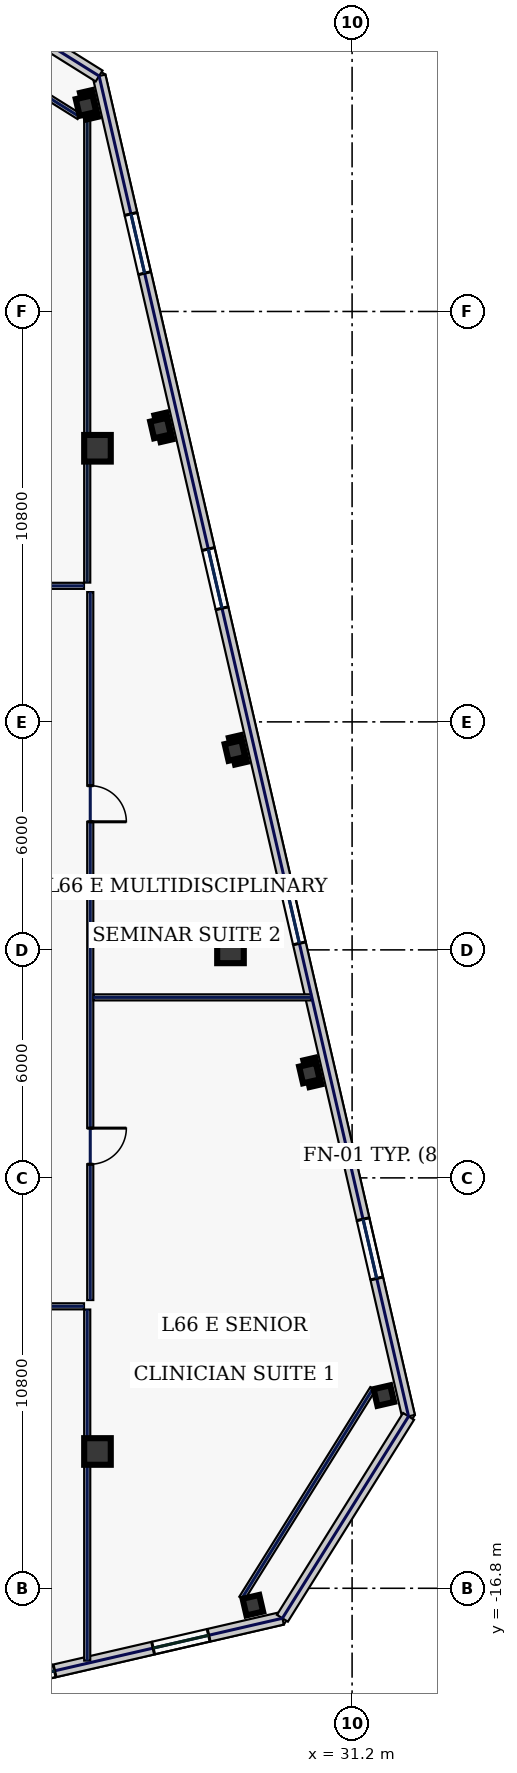
"""IFC4 building model, lengths in metres.
Left out: names, types, materials, properties, quantities, classifications, styles, units other than length and angle.
Written with IfcOpenShell. Run it as: python <this file> out.ifc"""

import sys

from ifc_helpers import new_model, si_unit, direction, frame, frame_2d, origin, origin_2d, place, context, subcontext, project, spatial, rectangle, hollow_rectangle, extrude, element, fill, save


model = new_model("IFC4")
c1 = context("Model", 3, precision=1e-05, world=origin(), true_north=direction((0.0, 1.0)))
c2 = subcontext(c1, "Body", "Model", "MODEL_VIEW")
j1 = project(units=[si_unit("LENGTHUNIT", "METRE"), si_unit("PLANEANGLEUNIT", "RADIAN")], contexts=[c1])
p1 = place(None, origin())
s1 = spatial("IfcSite", under=j1, at=p1, CompositionType="ELEMENT")
p2 = place(p1, origin())
s2 = spatial("IfcBuilding", under=s1, at=p2, CompositionType="ELEMENT")
p3 = place(p2, frame((0.0, 0.0, 285.0)))
s3 = spatial("IfcBuildingStorey", under=s2, at=p3, CompositionType="ELEMENT", Elevation=285.0)
for number, where, z_axis, x_axis in (
    (1, (24.5, -13.2, 0.0), (0.0, 0.0, 1.0), (1.0, 0.0, 0.0)),
    (2, (24.5, 13.2, 0.0), (0.0, 0.0, 1.0), (1.0, 0.0, 0.0)),
    (3, (28.0, 0.0, 0.0), (0.0, 0.0, 1.0), (1.0, 0.0, 0.0)),
):
    element("IfcColumn", number, at=place(p3, frame(where, z_axis=z_axis, x_axis=x_axis)), inside=s3, PredefinedType="COLUMN", context=c2, shape_type="SweptSolid", body=[
        extrude(hollow_rectangle(XDim=0.7, YDim=0.7, WallThickness=0.032, at=origin_2d()), origin(), (0.0, 0.0, 1.0), 3.74),
    ])
for number, where, z_axis, x_axis in (
    (4, (28.589, -17.245, 0.0), (0.0, 0.0, 1.0), (0.974, 0.225, 0.0)),
    (5, (32.036, -11.728, 0.0), (0.0, 0.0, 1.0), (0.974, 0.225, 0.0)),
    (6, (30.077, -3.241, 0.0), (0.0, 0.0, 1.0), (0.974, 0.225, 0.0)),
    (7, (28.117, 5.246, 0.0), (0.0, 0.0, 1.0), (0.974, 0.225, 0.0)),
    (8, (26.158, 13.732, 0.0), (0.0, 0.0, 1.0), (0.974, 0.225, 0.0)),
    (9, (24.198, 22.219, 0.0), (0.0, 0.0, 1.0), (0.974, 0.225, 0.0)),
):
    element("IfcColumn", number, at=place(p3, frame(where, z_axis=z_axis, x_axis=x_axis)), inside=s3, PredefinedType="COLUMN", context=c2, shape_type="SweptSolid", body=[
        extrude(hollow_rectangle(XDim=0.45, YDim=0.45, WallThickness=0.022, at=origin_2d()), origin(), (0.0, 0.0, 1.0), 3.74),
    ])
p4 = place(p3, frame((12.445, -21.495, 0.0), z_axis=(0.0, 0.0, 1.0), x_axis=(0.974369392164, 0.224953967767, 0.0)))
e10 = element("IfcWall", 10, at=p4, inside=s3, PredefinedType="STANDARD", context=c2, shape_type="SweptSolid", body=[
    extrude(rectangle(XDim=17.366, YDim=0.34, at=frame_2d((8.683, 0.0))), origin(), (0.0, 0.0, 1.0), 3.74),
])
p5 = place(p4, frame((2.729, 0.0, 0.9)))
e11 = element("IfcOpeningElement", 11, at=p5, cuts=e10, PredefinedType="OPENING", context=c2, shape_type="SweptSolid", body=[
    extrude(rectangle(XDim=1.5, YDim=2.0, at=frame_2d((0.75, 1.0))), frame((0.0, 0.18, 0.0), z_axis=(0.0, -1.0, 0.0), x_axis=(1.0, 0.0, 0.0)), (0.0, 0.0, 1.0), 0.36),
])
p6 = place(p4, frame((6.89, 0.0, 0.9)))
e12 = element("IfcOpeningElement", 12, at=p6, cuts=e10, PredefinedType="OPENING", context=c2, shape_type="SweptSolid", body=[
    extrude(rectangle(XDim=0.85, YDim=1.85, at=frame_2d((0.425, 0.925))), frame((0.0, 0.18, 0.0), z_axis=(0.0, -1.0, 0.0), x_axis=(1.0, 0.0, 0.0)), (0.0, 0.0, 1.0), 0.36),
])
p7 = place(p4, frame((10.363, 0.0, 0.9)))
e13 = element("IfcOpeningElement", 13, at=p7, cuts=e10, PredefinedType="OPENING", context=c2, shape_type="SweptSolid", body=[
    extrude(rectangle(XDim=0.85, YDim=1.85, at=frame_2d((0.425, 0.925))), frame((0.0, 0.18, 0.0), z_axis=(0.0, -1.0, 0.0), x_axis=(1.0, 0.0, 0.0)), (0.0, 0.0, 1.0), 0.36),
])
p8 = place(p4, frame((13.875, 0.0, 0.9)))
e14 = element("IfcOpeningElement", 14, at=p8, cuts=e10, PredefinedType="OPENING", context=c2, shape_type="SweptSolid", body=[
    extrude(rectangle(XDim=1.5, YDim=2.0, at=frame_2d((0.75, 1.0))), frame((0.0, 0.18, 0.0), z_axis=(0.0, -1.0, 0.0), x_axis=(1.0, 0.0, 0.0)), (0.0, 0.0, 1.0), 0.36),
])
p9 = place(p3, frame((32.686, -12.276, 0.0), z_axis=(0.0, 0.0, 1.0), x_axis=(-0.224953091034, 0.974369594576, 0.0)))
e15 = element("IfcWall", 15, at=p9, inside=s3, PredefinedType="STANDARD", context=c2, shape_type="SweptSolid", body=[
    extrude(rectangle(XDim=36.2, YDim=0.34, at=frame_2d((18.1, 0.0))), origin(), (0.0, 0.0, 1.0), 3.74),
])
p10 = place(p9, frame((3.725, 0.0, 0.58)))
e16 = element("IfcOpeningElement", 16, at=p10, cuts=e15, PredefinedType="OPENING", context=c2, shape_type="SweptSolid", body=[
    extrude(rectangle(XDim=1.6, YDim=2.3, at=frame_2d((0.8, 1.15))), frame((0.0, 0.18, 0.0), z_axis=(0.0, -1.0, 0.0), x_axis=(1.0, 0.0, 0.0)), (0.0, 0.0, 1.0), 0.36),
])
p11 = place(p9, frame((12.775, 0.0, 0.58)))
e17 = element("IfcOpeningElement", 17, at=p11, cuts=e15, PredefinedType="OPENING", context=c2, shape_type="SweptSolid", body=[
    extrude(rectangle(XDim=1.6, YDim=2.3, at=frame_2d((0.8, 1.15))), frame((0.0, 0.18, 0.0), z_axis=(0.0, -1.0, 0.0), x_axis=(1.0, 0.0, 0.0)), (0.0, 0.0, 1.0), 0.36),
])
p12 = place(p9, frame((21.825, 0.0, 0.58)))
e18 = element("IfcOpeningElement", 18, at=p12, cuts=e15, PredefinedType="OPENING", context=c2, shape_type="SweptSolid", body=[
    extrude(rectangle(XDim=1.6, YDim=2.3, at=frame_2d((0.8, 1.15))), frame((0.0, 0.18, 0.0), z_axis=(0.0, -1.0, 0.0), x_axis=(1.0, 0.0, 0.0)), (0.0, 0.0, 1.0), 0.36),
])
p13 = place(p9, frame((30.875, 0.0, 0.58)))
e19 = element("IfcOpeningElement", 19, at=p13, cuts=e15, PredefinedType="OPENING", context=c2, shape_type="SweptSolid", body=[
    extrude(rectangle(XDim=1.6, YDim=2.3, at=frame_2d((0.8, 1.15))), frame((0.0, 0.18, 0.0), z_axis=(0.0, -1.0, 0.0), x_axis=(1.0, 0.0, 0.0)), (0.0, 0.0, 1.0), 0.36),
])
for number, where, z_axis, x_axis in (
    (20, (29.366, -17.589, 0.0), (0.0, 0.0, 1.0), (0.53, 0.848, 0.0)),
    (21, (24.542, 22.996, 0.0), (0.0, 0.0, 1.0), (-0.848, 0.53, 0.0)),
):
    element("IfcWall", number, at=place(p3, frame(where, z_axis=z_axis, x_axis=x_axis)), inside=s3, PredefinedType="STANDARD", context=c2, shape_type="SweptSolid", body=[
        extrude(rectangle(XDim=6.265, YDim=0.34, at=frame_2d((3.132, 0.0))), origin(), (0.0, 0.0, 1.0), 3.74),
    ])
for number, where, z_axis, x_axis in (
    (22, (28.3, -17.065, 0.0), (0.0, 0.0, 1.0), (0.53, 0.848, 0.0)),
    (23, (24.018, 21.931, 0.0), (0.0, 0.0, 1.0), (-0.848, 0.53, 0.0)),
):
    element("IfcWall", number, at=place(p3, frame(where, z_axis=z_axis, x_axis=x_axis)), inside=s3, PredefinedType="PARTITIONING", context=c2, shape_type="SweptSolid", body=[
        extrude(rectangle(XDim=6.505, YDim=0.16, at=frame_2d((3.253, 0.0))), origin(), (0.0, 0.0, 1.0), 3.74),
    ])
p14 = place(p3, frame((-24.145, 9.58, 0.0), z_axis=(0.0, 0.0, 1.0), x_axis=(1.0, 0.0, 0.0)))
e24 = element("IfcWall", 24, at=p14, inside=s3, PredefinedType="PARTITIONING", context=c2, shape_type="SweptSolid", body=[
    extrude(rectangle(XDim=48.29, YDim=0.16, at=frame_2d((24.145, 0.0))), origin(), (0.0, 0.0, 1.0), 3.74),
])
p15 = place(p14, frame((1.869, 0.0, 0.0)))
e25 = element("IfcOpeningElement", 25, at=p15, cuts=e24, PredefinedType="OPENING", context=c2, shape_type="SweptSolid", body=[
    extrude(rectangle(XDim=1.3, YDim=2.2, at=frame_2d((0.65, 1.1))), frame((0.0, 0.09, 0.0), z_axis=(0.0, -1.0, 0.0), x_axis=(1.0, 0.0, 0.0)), (0.0, 0.0, 1.0), 0.18),
])
p16 = place(p14, frame((10.015, 0.0, 0.0)))
e26 = element("IfcOpeningElement", 26, at=p16, cuts=e24, PredefinedType="OPENING", context=c2, shape_type="SweptSolid", body=[
    extrude(rectangle(XDim=0.95, YDim=2.2, at=frame_2d((0.475, 1.1))), frame((0.0, 0.09, 0.0), z_axis=(0.0, -1.0, 0.0), x_axis=(1.0, 0.0, 0.0)), (0.0, 0.0, 1.0), 0.18),
])
p17 = place(p14, frame((21.08, 0.0, 0.0)))
e27 = element("IfcOpeningElement", 27, at=p17, cuts=e24, PredefinedType="OPENING", context=c2, shape_type="SweptSolid", body=[
    extrude(rectangle(XDim=1.3, YDim=2.2, at=frame_2d((0.65, 1.1))), frame((0.0, 0.09, 0.0), z_axis=(0.0, -1.0, 0.0), x_axis=(1.0, 0.0, 0.0)), (0.0, 0.0, 1.0), 0.18),
])
p18 = place(p14, frame((31.805, 0.0, 0.0)))
e28 = element("IfcOpeningElement", 28, at=p18, cuts=e24, PredefinedType="OPENING", context=c2, shape_type="SweptSolid", body=[
    extrude(rectangle(XDim=1.05, YDim=2.2, at=frame_2d((0.525, 1.1))), frame((0.0, 0.09, 0.0), z_axis=(0.0, -1.0, 0.0), x_axis=(1.0, 0.0, 0.0)), (0.0, 0.0, 1.0), 0.18),
])
p19 = place(p14, frame((40.145, 0.0, 0.0)))
e29 = element("IfcOpeningElement", 29, at=p19, cuts=e24, PredefinedType="OPENING", context=c2, shape_type="SweptSolid", body=[
    extrude(rectangle(XDim=0.95, YDim=2.2, at=frame_2d((0.475, 1.1))), frame((0.0, 0.09, 0.0), z_axis=(0.0, -1.0, 0.0), x_axis=(1.0, 0.0, 0.0)), (0.0, 0.0, 1.0), 0.18),
])
p20 = place(p14, frame((45.466, 0.0, 0.0)))
e30 = element("IfcOpeningElement", 30, at=p20, cuts=e24, PredefinedType="OPENING", context=c2, shape_type="SweptSolid", body=[
    extrude(rectangle(XDim=0.95, YDim=2.2, at=frame_2d((0.475, 1.1))), frame((0.0, 0.09, 0.0), z_axis=(0.0, -1.0, 0.0), x_axis=(1.0, 0.0, 0.0)), (0.0, 0.0, 1.0), 0.18),
])
p21 = place(p3, frame((24.31, 9.415, 0.0), z_axis=(0.0, 0.0, 1.0), x_axis=(0.0, -1.0, 0.0)))
e31 = element("IfcWall", 31, at=p21, inside=s3, PredefinedType="PARTITIONING", context=c2, shape_type="SweptSolid", body=[
    extrude(rectangle(XDim=18.63, YDim=0.16, at=frame_2d((9.315, 0.0))), origin(), (0.0, 0.0, 1.0), 3.74),
])
p22 = place(p21, frame((14.106, 0.0, 0.0)))
e32 = element("IfcOpeningElement", 32, at=p22, cuts=e31, PredefinedType="OPENING", context=c2, shape_type="SweptSolid", body=[
    extrude(rectangle(XDim=0.95, YDim=2.2, at=frame_2d((0.475, 1.1))), frame((0.0, 0.09, 0.0), z_axis=(0.0, -1.0, 0.0), x_axis=(1.0, 0.0, 0.0)), (0.0, 0.0, 1.0), 0.18),
])
p23 = place(p21, frame((5.094, 0.0, 0.0)))
e33 = element("IfcOpeningElement", 33, at=p23, cuts=e31, PredefinedType="OPENING", context=c2, shape_type="SweptSolid", body=[
    extrude(rectangle(XDim=0.95, YDim=2.2, at=frame_2d((0.475, 1.1))), frame((0.0, 0.09, 0.0), z_axis=(0.0, -1.0, 0.0), x_axis=(1.0, 0.0, 0.0)), (0.0, 0.0, 1.0), 0.18),
])
p24 = place(p3, frame((24.145, -9.38, 0.0), z_axis=(0.0, 0.0, 1.0), x_axis=(-1.0, 0.0, 0.0)))
e34 = element("IfcWall", 34, at=p24, inside=s3, PredefinedType="PARTITIONING", context=c2, shape_type="SweptSolid", body=[
    extrude(rectangle(XDim=36.68, YDim=0.16, at=frame_2d((18.34, 0.0))), origin(), (0.0, 0.0, 1.0), 3.74),
])
p25 = place(p24, frame((33.581, 0.0, 0.0)))
e35 = element("IfcOpeningElement", 35, at=p25, cuts=e34, PredefinedType="OPENING", context=c2, shape_type="SweptSolid", body=[
    extrude(rectangle(XDim=1.3, YDim=2.2, at=frame_2d((0.65, 1.1))), frame((0.0, 0.09, 0.0), z_axis=(0.0, -1.0, 0.0), x_axis=(1.0, 0.0, 0.0)), (0.0, 0.0, 1.0), 0.18),
])
p26 = place(p24, frame((28.946, 0.0, 0.0)))
e36 = element("IfcOpeningElement", 36, at=p26, cuts=e34, PredefinedType="OPENING", context=c2, shape_type="SweptSolid", body=[
    extrude(rectangle(XDim=1.3, YDim=2.2, at=frame_2d((0.65, 1.1))), frame((0.0, 0.09, 0.0), z_axis=(0.0, -1.0, 0.0), x_axis=(1.0, 0.0, 0.0)), (0.0, 0.0, 1.0), 0.18),
])
p27 = place(p24, frame((24.736, 0.0, 0.0)))
e37 = element("IfcOpeningElement", 37, at=p27, cuts=e34, PredefinedType="OPENING", context=c2, shape_type="SweptSolid", body=[
    extrude(rectangle(XDim=0.95, YDim=2.2, at=frame_2d((0.475, 1.1))), frame((0.0, 0.09, 0.0), z_axis=(0.0, -1.0, 0.0), x_axis=(1.0, 0.0, 0.0)), (0.0, 0.0, 1.0), 0.18),
])
p28 = place(p24, frame((18.455, 0.0, 0.0)))
e38 = element("IfcOpeningElement", 38, at=p28, cuts=e34, PredefinedType="OPENING", context=c2, shape_type="SweptSolid", body=[
    extrude(rectangle(XDim=0.95, YDim=2.2, at=frame_2d((0.475, 1.1))), frame((0.0, 0.09, 0.0), z_axis=(0.0, -1.0, 0.0), x_axis=(1.0, 0.0, 0.0)), (0.0, 0.0, 1.0), 0.18),
])
p29 = place(p24, frame((9.905, 0.0, 0.0)))
e39 = element("IfcOpeningElement", 39, at=p29, cuts=e34, PredefinedType="OPENING", context=c2, shape_type="SweptSolid", body=[
    extrude(rectangle(XDim=0.95, YDim=2.2, at=frame_2d((0.475, 1.1))), frame((0.0, 0.09, 0.0), z_axis=(0.0, -1.0, 0.0), x_axis=(1.0, 0.0, 0.0)), (0.0, 0.0, 1.0), 0.18),
])
p30 = place(p24, frame((2.784, 0.0, 0.0)))
e40 = element("IfcOpeningElement", 40, at=p30, cuts=e34, PredefinedType="OPENING", context=c2, shape_type="SweptSolid", body=[
    extrude(rectangle(XDim=1.05, YDim=2.2, at=frame_2d((0.525, 1.1))), frame((0.0, 0.09, 0.0), z_axis=(0.0, -1.0, 0.0), x_axis=(1.0, 0.0, 0.0)), (0.0, 0.0, 1.0), 0.18),
])
p31 = place(p3, frame((24.23, 9.665, 0.0), z_axis=(0.0, 0.0, 1.0), x_axis=(0.0, 1.0, 0.0)))
e41 = element("IfcWall", 41, at=p31, inside=s3, PredefinedType="PARTITIONING", context=c2, shape_type="SweptSolid", body=[
    extrude(rectangle(XDim=12.906, YDim=0.16, at=frame_2d((6.453, 0.0))), origin(), (0.0, 0.0, 1.0), 3.185),
])
p32 = place(p3, frame((24.23, -18.703, 0.0), z_axis=(0.0, 0.0, 1.0), x_axis=(0.0, 1.0, 0.0)))
e42 = element("IfcWall", 42, at=p32, inside=s3, PredefinedType="PARTITIONING", context=c2, shape_type="SweptSolid", body=[
    extrude(rectangle(XDim=9.238, YDim=0.16, at=frame_2d((4.619, 0.0))), origin(), (0.0, 0.0, 1.0), 3.74),
])
p33 = place(p3, frame((24.395, -1.25, 0.0), z_axis=(0.0, 0.0, 1.0), x_axis=(1.0, 0.0, 0.0)))
e43 = element("IfcWall", 43, at=p33, inside=s3, PredefinedType="PARTITIONING", context=c2, shape_type="SweptSolid", body=[
    extrude(rectangle(XDim=5.725, YDim=0.16, at=frame_2d((2.862, 0.0))), origin(), (0.0, 0.0, 1.0), 3.74),
])
p34 = place(p7, origin())
e44 = element("IfcWindow", 44, at=p34, inside=s3, PartitioningType="SINGLE_PANEL", PredefinedType="WINDOW", context=c2, shape_type="SweptSolid", body=[
    extrude(rectangle(XDim=0.85, YDim=1.85, at=frame_2d((0.425, 0.925))), frame((0.0, 0.03, 0.0), z_axis=(0.0, -1.0, 0.0), x_axis=(1.0, 0.0, 0.0)), (0.0, 0.0, 1.0), 0.06),
])
fill(e13, e44)
p35 = place(p8, origin())
e45 = element("IfcWindow", 45, at=p35, inside=s3, PartitioningType="SINGLE_PANEL", PredefinedType="WINDOW", context=c2, shape_type="SweptSolid", body=[
    extrude(rectangle(XDim=1.5, YDim=2.0, at=frame_2d((0.75, 1.0))), frame((0.0, 0.03, 0.0), z_axis=(0.0, -1.0, 0.0), x_axis=(1.0, 0.0, 0.0)), (0.0, 0.0, 1.0), 0.06),
])
fill(e14, e45)
p36 = place(p10, origin())
e46 = element("IfcWindow", 46, at=p36, inside=s3, PartitioningType="SINGLE_PANEL", PredefinedType="WINDOW", context=c2, shape_type="SweptSolid", body=[
    extrude(rectangle(XDim=1.6, YDim=2.3, at=frame_2d((0.8, 1.15))), frame((0.0, 0.03, 0.0), z_axis=(0.0, -1.0, 0.0), x_axis=(1.0, 0.0, 0.0)), (0.0, 0.0, 1.0), 0.06),
])
fill(e16, e46)
p37 = place(p11, origin())
e47 = element("IfcWindow", 47, at=p37, inside=s3, PartitioningType="SINGLE_PANEL", PredefinedType="WINDOW", context=c2, shape_type="SweptSolid", body=[
    extrude(rectangle(XDim=1.6, YDim=2.3, at=frame_2d((0.8, 1.15))), frame((0.0, 0.03, 0.0), z_axis=(0.0, -1.0, 0.0), x_axis=(1.0, 0.0, 0.0)), (0.0, 0.0, 1.0), 0.06),
])
fill(e17, e47)
p38 = place(p12, origin())
e48 = element("IfcWindow", 48, at=p38, inside=s3, PartitioningType="SINGLE_PANEL", PredefinedType="WINDOW", context=c2, shape_type="SweptSolid", body=[
    extrude(rectangle(XDim=1.6, YDim=2.3, at=frame_2d((0.8, 1.15))), frame((0.0, 0.03, 0.0), z_axis=(0.0, -1.0, 0.0), x_axis=(1.0, 0.0, 0.0)), (0.0, 0.0, 1.0), 0.06),
])
fill(e18, e48)
p39 = place(p13, origin())
e49 = element("IfcWindow", 49, at=p39, inside=s3, PartitioningType="SINGLE_PANEL", PredefinedType="WINDOW", context=c2, shape_type="SweptSolid", body=[
    extrude(rectangle(XDim=1.6, YDim=2.3, at=frame_2d((0.8, 1.15))), frame((0.0, 0.03, 0.0), z_axis=(0.0, -1.0, 0.0), x_axis=(1.0, 0.0, 0.0)), (0.0, 0.0, 1.0), 0.06),
])
fill(e19, e49)
p40 = place(p22, origin())
e50 = element("IfcDoor", 50, at=p40, inside=s3, OperationType="SINGLE_SWING_LEFT", PredefinedType="DOOR", context=c2, shape_type="SweptSolid", body=[
    extrude(rectangle(XDim=0.95, YDim=2.2, at=frame_2d((0.475, 1.1))), frame((0.0, 0.025, 0.0), z_axis=(0.0, -1.0, 0.0), x_axis=(1.0, 0.0, 0.0)), (0.0, 0.0, 1.0), 0.05),
])
fill(e32, e50)
p41 = place(p23, origin())
e51 = element("IfcDoor", 51, at=p41, inside=s3, OperationType="SINGLE_SWING_RIGHT", PredefinedType="DOOR", context=c2, shape_type="SweptSolid", body=[
    extrude(rectangle(XDim=0.95, YDim=2.2, at=frame_2d((0.475, 1.1))), frame((0.0, 0.025, 0.0), z_axis=(0.0, -1.0, 0.0), x_axis=(1.0, 0.0, 0.0)), (0.0, 0.0, 1.0), 0.05),
])
fill(e33, e51)
save(model, sys.argv[1])
